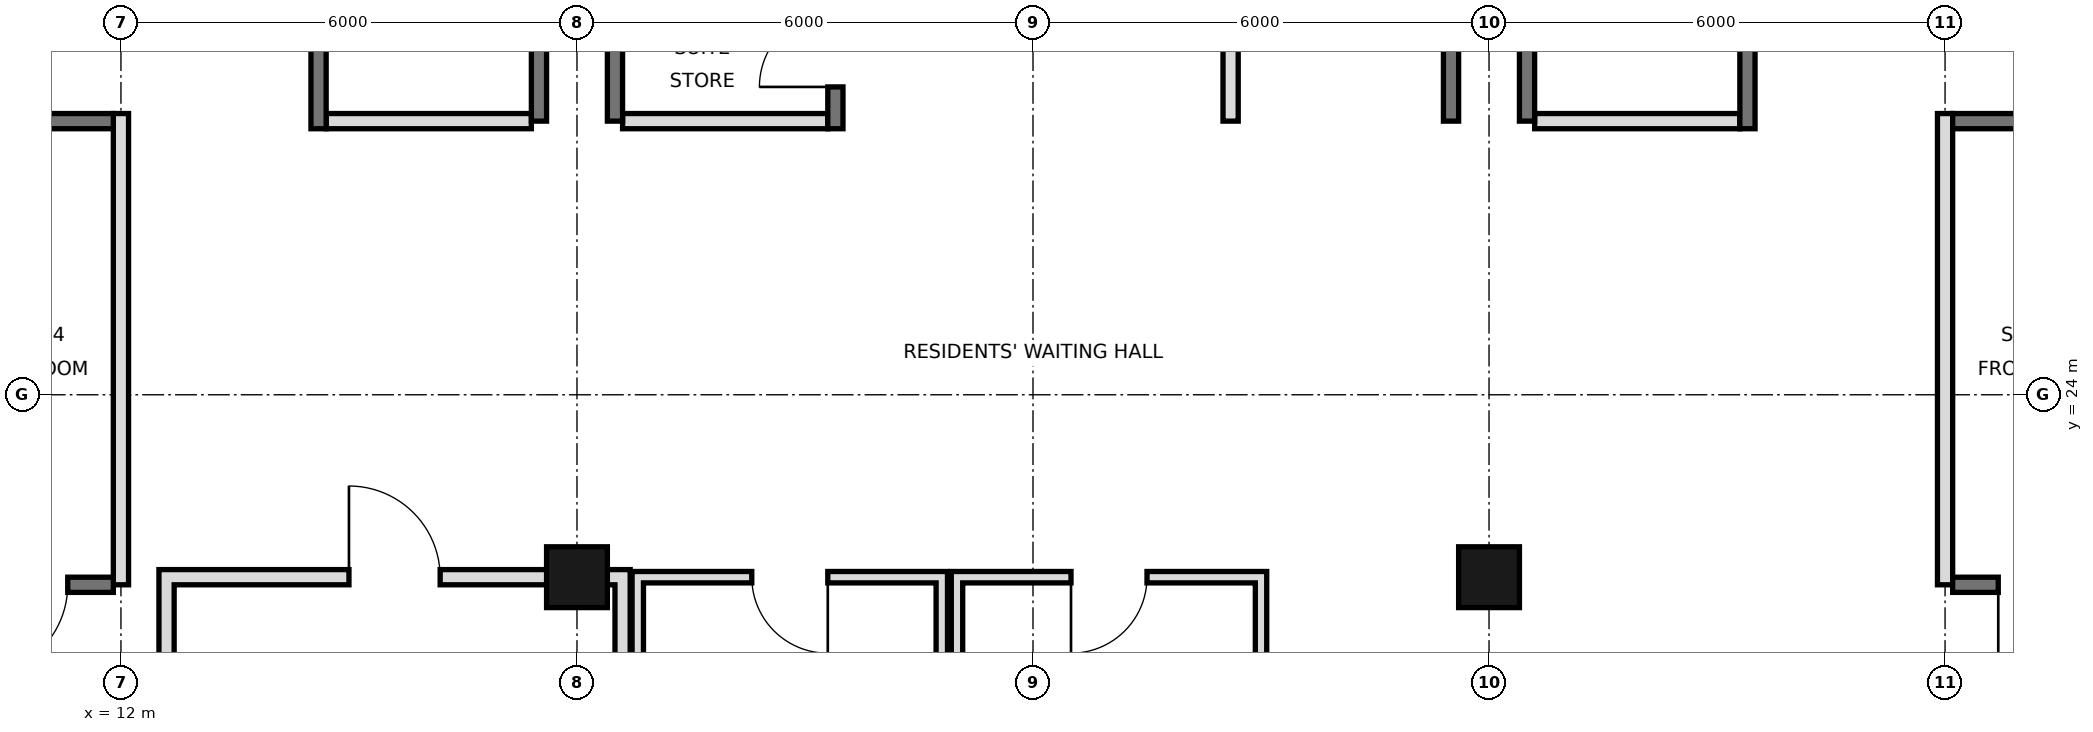
"""IFC4 building model, lengths in metres.
Left out: names, types, materials, properties, quantities, classifications, styles, units other than length and angle.
Written with IfcOpenShell. Run it as: python <this file> out.ifc"""

import sys

from ifc_helpers import new_model, si_unit, direction, frame, frame_2d, origin, origin_2d, place, context, subcontext, project, spatial, rectangle, hollow_rectangle, extrude, element, fill, save


model = new_model("IFC4")
c1 = context("Model", 3, precision=1e-05, world=origin(), true_north=direction((0.0, 1.0)))
c2 = subcontext(c1, "Body", "Model", "MODEL_VIEW")
j1 = project(units=[si_unit("LENGTHUNIT", "METRE"), si_unit("PLANEANGLEUNIT", "RADIAN")], contexts=[c1])
p1 = place(None, origin())
s1 = spatial("IfcSite", under=j1, at=p1, CompositionType="ELEMENT")
p2 = place(p1, origin())
s2 = spatial("IfcBuilding", under=s1, at=p2, CompositionType="ELEMENT")
p3 = place(p2, frame((0.0, 0.0, 349.8)))
s3 = spatial("IfcBuildingStorey", under=s2, at=p3, CompositionType="ELEMENT", Elevation=349.8)
for number, where, z_axis, x_axis in (
    (1, (18.0, 21.6, 0.0), (0.0, 0.0, 1.0), (1.0, 0.0, 0.0)),
    (2, (30.0, 21.6, 0.0), (0.0, 0.0, 1.0), (1.0, 0.0, 0.0)),
):
    element("IfcColumn", number, at=place(p3, frame(where, z_axis=z_axis, x_axis=x_axis)), inside=s3, PredefinedType="COLUMN", context=c2, shape_type="SweptSolid", body=[
        extrude(hollow_rectangle(XDim=0.8, YDim=0.8, WallThickness=0.025, at=origin_2d()), origin(), (0.0, 0.0, 1.0), 4.0),
    ])
p4 = place(p3, frame((12.6, 17.5, 0.0), z_axis=(0.0, 0.0, 1.0), x_axis=(0.0, 1.0, 0.0)))
e3 = element("IfcWall", 3, at=p4, inside=s3, PredefinedType="SOLIDWALL", context=c2, shape_type="SweptSolid", body=[
    extrude(rectangle(XDim=4.2, YDim=0.2, at=frame_2d((2.1, 0.0))), origin(), (0.0, 0.0, 1.0), 3.75),
])
p5 = place(p3, frame((18.6, 17.5, 0.0), z_axis=(0.0, 0.0, 1.0), x_axis=(0.0, 1.0, 0.0)))
e4 = element("IfcWall", 4, at=p5, inside=s3, PredefinedType="SOLIDWALL", context=c2, shape_type="SweptSolid", body=[
    extrude(rectangle(XDim=4.2, YDim=0.2, at=frame_2d((2.1, 0.0))), origin(), (0.0, 0.0, 1.0), 3.05),
])
for number, where, z_axis, x_axis in (
    (5, (18.8, 17.525, 0.0), (0.0, 0.0, 1.0), (0.0, 1.0, 0.0)),
    (6, (22.8, 17.525, 0.0), (0.0, 0.0, 1.0), (0.0, 1.0, 0.0)),
    (7, (23.0, 17.525, 0.0), (0.0, 0.0, 1.0), (0.0, 1.0, 0.0)),
    (8, (27.0, 17.525, 0.0), (0.0, 0.0, 1.0), (0.0, 1.0, 0.0)),
):
    element("IfcWall", number, at=place(p3, frame(where, z_axis=z_axis, x_axis=x_axis)), inside=s3, PredefinedType="PARTITIONING", context=c2, shape_type="SweptSolid", body=[
        extrude(rectangle(XDim=4.15, YDim=0.15, at=frame_2d((2.075, 0.0))), origin(), (0.0, 0.0, 1.0), 3.75),
    ])
p6 = place(p3, frame((12.7, 21.6, 0.0), z_axis=(0.0, 0.0, 1.0), x_axis=(1.0, 0.0, 0.0)))
e9 = element("IfcWall", 9, at=p6, inside=s3, PredefinedType="SOLIDWALL", context=c2, shape_type="SweptSolid", body=[
    extrude(rectangle(XDim=5.8, YDim=0.2, at=frame_2d((2.9, 0.0))), origin(), (0.0, 0.0, 1.0), 3.75),
])
p7 = place(p6, frame((2.3, 0.0, 0.0)))
e10 = element("IfcOpeningElement", 10, at=p7, cuts=e9, PredefinedType="OPENING", context=c2, shape_type="SweptSolid", body=[
    extrude(rectangle(XDim=1.2, YDim=2.4, at=frame_2d((0.6, 1.2))), frame((0.0, 0.11, 0.0), z_axis=(0.0, -1.0, 0.0), x_axis=(1.0, 0.0, 0.0)), (0.0, 0.0, 1.0), 0.22),
])
p8 = place(p3, frame((18.875, 21.6, 0.0), z_axis=(0.0, 0.0, 1.0), x_axis=(1.0, 0.0, 0.0)))
e11 = element("IfcWall", 11, at=p8, inside=s3, PredefinedType="PARTITIONING", context=c2, shape_type="SweptSolid", body=[
    extrude(rectangle(XDim=3.85, YDim=0.15, at=frame_2d((1.925, 0.0))), origin(), (0.0, 0.0, 1.0), 3.75),
])
p9 = place(p8, frame((1.425, 0.0, 0.0)))
e12 = element("IfcOpeningElement", 12, at=p9, cuts=e11, PredefinedType="OPENING", context=c2, shape_type="SweptSolid", body=[
    extrude(rectangle(XDim=1.0, YDim=2.4, at=frame_2d((0.5, 1.2))), frame((0.0, 0.085, 0.0), z_axis=(0.0, -1.0, 0.0), x_axis=(1.0, 0.0, 0.0)), (0.0, 0.0, 1.0), 0.17),
])
p10 = place(p3, frame((23.075, 21.6, 0.0), z_axis=(0.0, 0.0, 1.0), x_axis=(1.0, 0.0, 0.0)))
e13 = element("IfcWall", 13, at=p10, inside=s3, PredefinedType="PARTITIONING", context=c2, shape_type="SweptSolid", body=[
    extrude(rectangle(XDim=3.85, YDim=0.15, at=frame_2d((1.925, 0.0))), origin(), (0.0, 0.0, 1.0), 3.75),
])
p11 = place(p10, frame((1.425, 0.0, 0.0)))
e14 = element("IfcOpeningElement", 14, at=p11, cuts=e13, PredefinedType="OPENING", context=c2, shape_type="SweptSolid", body=[
    extrude(rectangle(XDim=1.0, YDim=2.4, at=frame_2d((0.5, 1.2))), frame((0.0, 0.085, 0.0), z_axis=(0.0, -1.0, 0.0), x_axis=(1.0, 0.0, 0.0)), (0.0, 0.0, 1.0), 0.17),
])
for number, where, z_axis, x_axis in (
    (15, (17.5, 27.6, 0.0), (0.0, 0.0, 1.0), (0.0, 1.0, 0.0)),
    (16, (18.5, 27.6, 0.0), (0.0, 0.0, 1.0), (0.0, 1.0, 0.0)),
    (17, (29.5, 27.6, 0.0), (0.0, 0.0, 1.0), (0.0, 1.0, 0.0)),
    (18, (30.5, 27.6, 0.0), (0.0, 0.0, 1.0), (0.0, 1.0, 0.0)),
):
    element("IfcWall", number, at=place(p3, frame(where, z_axis=z_axis, x_axis=x_axis)), inside=s3, PredefinedType="SOLIDWALL", context=c2, shape_type="SweptSolid", body=[
        extrude(rectangle(XDim=17.5, YDim=0.2, at=frame_2d((8.75, 0.0))), origin(), (0.0, 0.0, 1.0), 3.75),
    ])
p12 = place(p3, frame((12.0, 21.5, 0.0), z_axis=(0.0, 0.0, 1.0), x_axis=(0.0, 1.0, 0.0)))
e19 = element("IfcWall", 19, at=p12, inside=s3, PredefinedType="PARTITIONING", context=c2, shape_type="SweptSolid", body=[
    extrude(rectangle(XDim=6.2, YDim=0.2, at=frame_2d((3.1, 0.0))), origin(), (0.0, 0.0, 1.0), 3.75),
])
p13 = place(p3, frame((14.6, 27.5, 0.0), z_axis=(0.0, 0.0, 1.0), x_axis=(0.0, 1.0, 0.0)))
e20 = element("IfcWall", 20, at=p13, inside=s3, PredefinedType="SOLIDWALL", context=c2, shape_type="SweptSolid", body=[
    extrude(rectangle(XDim=17.5, YDim=0.2, at=frame_2d((8.75, 0.0))), origin(), (0.0, 0.0, 1.0), 3.75),
])
p14 = place(p13, frame((15.4, 0.0, 0.0)))
e21 = element("IfcOpeningElement", 21, at=p14, cuts=e20, PredefinedType="OPENING", context=c2, shape_type="SweptSolid", body=[
    extrude(rectangle(XDim=1.1, YDim=2.1, at=frame_2d((0.55, 1.05))), frame((0.0, 0.11, 0.0), z_axis=(0.0, -1.0, 0.0), x_axis=(1.0, 0.0, 0.0)), (0.0, 0.0, 1.0), 0.22),
])
p15 = place(p13, frame((1.15, 0.0, 0.0)))
e22 = element("IfcOpeningElement", 22, at=p15, cuts=e20, PredefinedType="OPENING", context=c2, shape_type="SweptSolid", body=[
    extrude(rectangle(XDim=1.0, YDim=2.1, at=frame_2d((0.5, 1.05))), frame((0.0, 0.11, 0.0), z_axis=(0.0, -1.0, 0.0), x_axis=(1.0, 0.0, 0.0)), (0.0, 0.0, 1.0), 0.22),
])
p16 = place(p13, frame((4.25, 0.0, 0.0)))
e23 = element("IfcOpeningElement", 23, at=p16, cuts=e20, PredefinedType="OPENING", context=c2, shape_type="SweptSolid", body=[
    extrude(rectangle(XDim=1.0, YDim=2.1, at=frame_2d((0.5, 1.05))), frame((0.0, 0.11, 0.0), z_axis=(0.0, -1.0, 0.0), x_axis=(1.0, 0.0, 0.0)), (0.0, 0.0, 1.0), 0.22),
])
p17 = place(p3, frame((21.4, 27.5, 0.0), z_axis=(0.0, 0.0, 1.0), x_axis=(0.0, 1.0, 0.0)))
e24 = element("IfcWall", 24, at=p17, inside=s3, PredefinedType="SOLIDWALL", context=c2, shape_type="SweptSolid", body=[
    extrude(rectangle(XDim=17.5, YDim=0.2, at=frame_2d((8.75, 0.0))), origin(), (0.0, 0.0, 1.0), 3.75),
])
p18 = place(p17, frame((0.55, 0.0, 0.0)))
e25 = element("IfcOpeningElement", 25, at=p18, cuts=e24, PredefinedType="OPENING", context=c2, shape_type="SweptSolid", body=[
    extrude(rectangle(XDim=1.0, YDim=2.1, at=frame_2d((0.5, 1.05))), frame((0.0, 0.11, 0.0), z_axis=(0.0, -1.0, 0.0), x_axis=(1.0, 0.0, 0.0)), (0.0, 0.0, 1.0), 0.22),
])
p19 = place(p17, frame((3.65, 0.0, 0.0)))
e26 = element("IfcOpeningElement", 26, at=p19, cuts=e24, PredefinedType="OPENING", context=c2, shape_type="SweptSolid", body=[
    extrude(rectangle(XDim=1.0, YDim=2.1, at=frame_2d((0.5, 1.05))), frame((0.0, 0.11, 0.0), z_axis=(0.0, -1.0, 0.0), x_axis=(1.0, 0.0, 0.0)), (0.0, 0.0, 1.0), 0.22),
])
p20 = place(p17, frame((9.8, 0.0, 0.0)))
e27 = element("IfcOpeningElement", 27, at=p20, cuts=e24, PredefinedType="OPENING", context=c2, shape_type="SweptSolid", body=[
    extrude(rectangle(XDim=1.0, YDim=2.1, at=frame_2d((0.5, 1.05))), frame((0.0, 0.11, 0.0), z_axis=(0.0, -1.0, 0.0), x_axis=(1.0, 0.0, 0.0)), (0.0, 0.0, 1.0), 0.22),
])
p21 = place(p3, frame((26.6, 27.6, 0.0), z_axis=(0.0, 0.0, 1.0), x_axis=(0.0, 1.0, 0.0)))
e28 = element("IfcWall", 28, at=p21, inside=s3, PredefinedType="PARTITIONING", context=c2, shape_type="SweptSolid", body=[
    extrude(rectangle(XDim=17.4, YDim=0.2, at=frame_2d((8.7, 0.0))), origin(), (0.0, 0.0, 1.0), 3.75),
])
p22 = place(p21, frame((10.25, 0.0, 0.0)))
e29 = element("IfcOpeningElement", 29, at=p22, cuts=e28, PredefinedType="OPENING", context=c2, shape_type="SweptSolid", body=[
    extrude(rectangle(XDim=1.0, YDim=2.1, at=frame_2d((0.5, 1.05))), frame((0.0, 0.11, 0.0), z_axis=(0.0, -1.0, 0.0), x_axis=(1.0, 0.0, 0.0)), (0.0, 0.0, 1.0), 0.22),
])
p23 = place(p3, frame((33.4, 27.5, 0.0), z_axis=(0.0, 0.0, 1.0), x_axis=(0.0, 1.0, 0.0)))
e30 = element("IfcWall", 30, at=p23, inside=s3, PredefinedType="SOLIDWALL", context=c2, shape_type="SweptSolid", body=[
    extrude(rectangle(XDim=17.5, YDim=0.2, at=frame_2d((8.75, 0.0))), origin(), (0.0, 0.0, 1.0), 3.75),
])
p24 = place(p23, frame((15.4, 0.0, 0.0)))
e31 = element("IfcOpeningElement", 31, at=p24, cuts=e30, PredefinedType="OPENING", context=c2, shape_type="SweptSolid", body=[
    extrude(rectangle(XDim=1.1, YDim=2.1, at=frame_2d((0.55, 1.05))), frame((0.0, 0.11, 0.0), z_axis=(0.0, -1.0, 0.0), x_axis=(1.0, 0.0, 0.0)), (0.0, 0.0, 1.0), 0.22),
])
p25 = place(p23, frame((1.15, 0.0, 0.0)))
e32 = element("IfcOpeningElement", 32, at=p25, cuts=e30, PredefinedType="OPENING", context=c2, shape_type="SweptSolid", body=[
    extrude(rectangle(XDim=1.0, YDim=2.1, at=frame_2d((0.5, 1.05))), frame((0.0, 0.11, 0.0), z_axis=(0.0, -1.0, 0.0), x_axis=(1.0, 0.0, 0.0)), (0.0, 0.0, 1.0), 0.22),
])
p26 = place(p23, frame((4.25, 0.0, 0.0)))
e33 = element("IfcOpeningElement", 33, at=p26, cuts=e30, PredefinedType="OPENING", context=c2, shape_type="SweptSolid", body=[
    extrude(rectangle(XDim=1.0, YDim=2.1, at=frame_2d((0.5, 1.05))), frame((0.0, 0.11, 0.0), z_axis=(0.0, -1.0, 0.0), x_axis=(1.0, 0.0, 0.0)), (0.0, 0.0, 1.0), 0.22),
])
p27 = place(p3, frame((36.0, 21.5, 0.0), z_axis=(0.0, 0.0, 1.0), x_axis=(0.0, 1.0, 0.0)))
e34 = element("IfcWall", 34, at=p27, inside=s3, PredefinedType="PARTITIONING", context=c2, shape_type="SweptSolid", body=[
    extrude(rectangle(XDim=6.2, YDim=0.2, at=frame_2d((3.1, 0.0))), origin(), (0.0, 0.0, 1.0), 3.75),
])
p28 = place(p3, frame((36.1, 21.5, 0.0), z_axis=(0.0, 0.0, 1.0), x_axis=(1.0, 0.0, 0.0)))
e35 = element("IfcWall", 35, at=p28, inside=s3, PredefinedType="SOLIDWALL", context=c2, shape_type="SweptSolid", body=[
    extrude(rectangle(XDim=5.3, YDim=0.2, at=frame_2d((2.65, 0.0))), origin(), (0.0, 0.0, 1.0), 3.75),
])
p29 = place(p28, frame((0.6, 0.0, 0.0)))
e36 = element("IfcOpeningElement", 36, at=p29, cuts=e35, PredefinedType="OPENING", context=c2, shape_type="SweptSolid", body=[
    extrude(rectangle(XDim=1.2, YDim=2.1, at=frame_2d((0.6, 1.05))), frame((0.0, 0.11, 0.0), z_axis=(0.0, -1.0, 0.0), x_axis=(1.0, 0.0, 0.0)), (0.0, 0.0, 1.0), 0.22),
])
p30 = place(p3, frame((6.6, 21.5, 0.0), z_axis=(0.0, 0.0, 1.0), x_axis=(1.0, 0.0, 0.0)))
e37 = element("IfcWall", 37, at=p30, inside=s3, PredefinedType="SOLIDWALL", context=c2, shape_type="SweptSolid", body=[
    extrude(rectangle(XDim=5.3, YDim=0.2, at=frame_2d((2.65, 0.0))), origin(), (0.0, 0.0, 1.0), 3.75),
])
p31 = place(p30, frame((3.5, 0.0, 0.0)))
e38 = element("IfcOpeningElement", 38, at=p31, cuts=e37, PredefinedType="OPENING", context=c2, shape_type="SweptSolid", body=[
    extrude(rectangle(XDim=1.2, YDim=2.1, at=frame_2d((0.6, 1.05))), frame((0.0, 0.11, 0.0), z_axis=(0.0, -1.0, 0.0), x_axis=(1.0, 0.0, 0.0)), (0.0, 0.0, 1.0), 0.22),
])
for number, where, z_axis, x_axis in (
    (39, (14.7, 27.6, 0.0), (0.0, 0.0, 1.0), (1.0, 0.0, 0.0)),
    (40, (18.6, 27.6, 0.0), (0.0, 0.0, 1.0), (1.0, 0.0, 0.0)),
    (41, (30.6, 27.6, 0.0), (0.0, 0.0, 1.0), (1.0, 0.0, 0.0)),
):
    element("IfcWall", number, at=place(p3, frame(where, z_axis=z_axis, x_axis=x_axis)), inside=s3, PredefinedType="PARTITIONING", context=c2, shape_type="SweptSolid", body=[
        extrude(rectangle(XDim=2.7, YDim=0.2, at=frame_2d((1.35, 0.0))), origin(), (0.0, 0.0, 1.0), 3.75),
    ])
for number, where, z_axis, x_axis in (
    (42, (36.1, 27.6, 0.0), (0.0, 0.0, 1.0), (1.0, 0.0, 0.0)),
    (43, (6.6, 27.6, 0.0), (0.0, 0.0, 1.0), (1.0, 0.0, 0.0)),
):
    element("IfcWall", number, at=place(p3, frame(where, z_axis=z_axis, x_axis=x_axis)), inside=s3, PredefinedType="SOLIDWALL", context=c2, shape_type="SweptSolid", body=[
        extrude(rectangle(XDim=5.3, YDim=0.2, at=frame_2d((2.65, 0.0))), origin(), (0.0, 0.0, 1.0), 3.75),
    ])
p32 = place(p7, origin())
e44 = element("IfcDoor", 44, at=p32, inside=s3, OperationType="SINGLE_SWING_LEFT", PredefinedType="DOOR", context=c2, shape_type="SweptSolid", body=[
    extrude(rectangle(XDim=1.2, YDim=2.4, at=frame_2d((0.6, 1.2))), frame((0.0, 0.025, 0.0), z_axis=(0.0, -1.0, 0.0), x_axis=(1.0, 0.0, 0.0)), (0.0, 0.0, 1.0), 0.05),
])
fill(e10, e44)
p33 = place(p9, origin())
e45 = element("IfcDoor", 45, at=p33, inside=s3, OperationType="SINGLE_SWING_RIGHT", PredefinedType="DOOR", context=c2, shape_type="SweptSolid", body=[
    extrude(rectangle(XDim=1.0, YDim=2.4, at=frame_2d((0.5, 1.2))), frame((0.0, 0.025, 0.0), z_axis=(0.0, -1.0, 0.0), x_axis=(1.0, 0.0, 0.0)), (0.0, 0.0, 1.0), 0.05),
])
fill(e12, e45)
p34 = place(p11, frame((1.0, 0.0, 0.0), z_axis=(0.0, 0.0, 1.0), x_axis=(-1.0, 0.0, 0.0)))
e46 = element("IfcDoor", 46, at=p34, inside=s3, OperationType="SINGLE_SWING_RIGHT", PredefinedType="DOOR", context=c2, shape_type="SweptSolid", body=[
    extrude(rectangle(XDim=1.0, YDim=2.4, at=frame_2d((0.5, 1.2))), frame((0.0, 0.025, 0.0), z_axis=(0.0, -1.0, 0.0), x_axis=(1.0, 0.0, 0.0)), (0.0, 0.0, 1.0), 0.05),
])
fill(e14, e46)
p35 = place(p31, frame((1.2, 0.0, 0.0), z_axis=(0.0, 0.0, 1.0), x_axis=(-1.0, 0.0, 0.0)))
e47 = element("IfcDoor", 47, at=p35, inside=s3, OperationType="SINGLE_SWING_RIGHT", PredefinedType="DOOR", context=c2, shape_type="SweptSolid", body=[
    extrude(rectangle(XDim=1.2, YDim=2.1, at=frame_2d((0.6, 1.05))), frame((0.0, 0.025, 0.0), z_axis=(0.0, -1.0, 0.0), x_axis=(1.0, 0.0, 0.0)), (0.0, 0.0, 1.0), 0.05),
])
fill(e38, e47)
p36 = place(p29, frame((1.2, 0.0, 0.0), z_axis=(0.0, 0.0, 1.0), x_axis=(-1.0, 0.0, 0.0)))
e48 = element("IfcDoor", 48, at=p36, inside=s3, OperationType="SINGLE_SWING_RIGHT", PredefinedType="DOOR", context=c2, shape_type="SweptSolid", body=[
    extrude(rectangle(XDim=1.2, YDim=2.1, at=frame_2d((0.6, 1.05))), frame((0.0, 0.025, 0.0), z_axis=(0.0, -1.0, 0.0), x_axis=(1.0, 0.0, 0.0)), (0.0, 0.0, 1.0), 0.05),
])
fill(e36, e48)
p37 = place(p18, origin())
e49 = element("IfcDoor", 49, at=p37, inside=s3, OperationType="SINGLE_SWING_LEFT", PredefinedType="DOOR", context=c2, shape_type="SweptSolid", body=[
    extrude(rectangle(XDim=1.0, YDim=2.1, at=frame_2d((0.5, 1.05))), frame((0.0, 0.025, 0.0), z_axis=(0.0, -1.0, 0.0), x_axis=(1.0, 0.0, 0.0)), (0.0, 0.0, 1.0), 0.05),
])
fill(e25, e49)
save(model, sys.argv[1])
